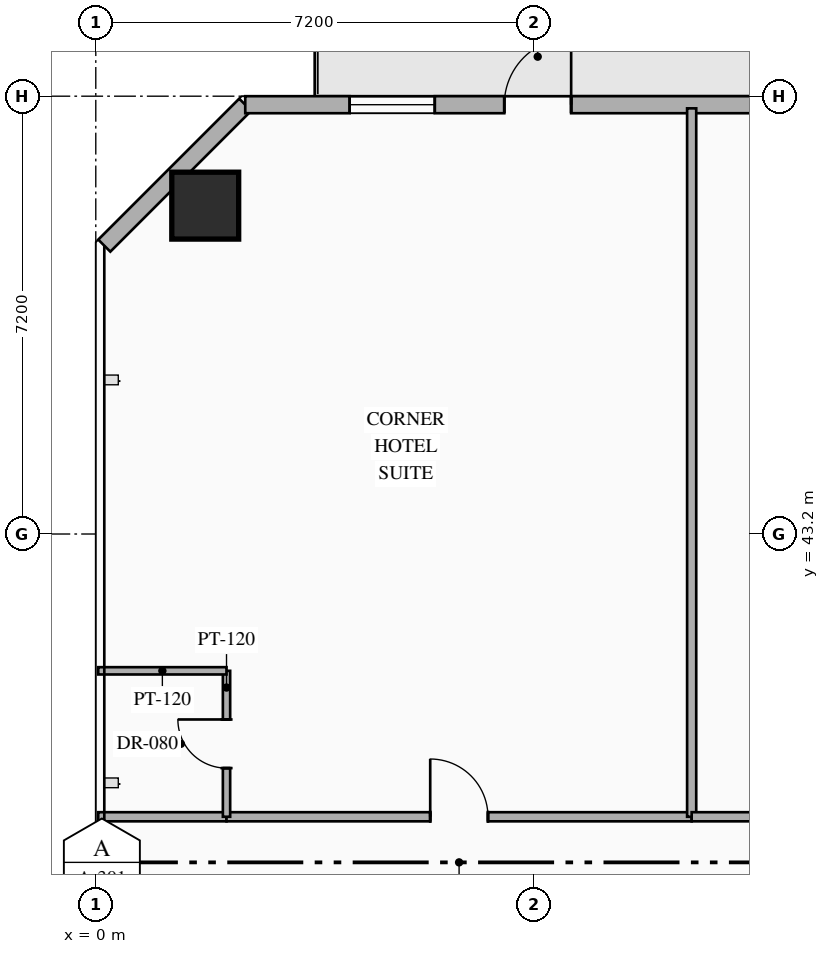
"""IFC4 building model, lengths in metres.
Left out: names, types, materials, properties, quantities, classifications, styles, units other than length and angle.
Written with IfcOpenShell. Run it as: python <this file> out.ifc"""

import sys

from ifc_helpers import new_model, si_unit, direction, frame, frame_2d, origin, origin_2d, place, context, subcontext, project, spatial, rectangle, hollow_rectangle, extrude, element, fill, save


model = new_model("IFC4")
c1 = context("Model", 3, precision=1e-05, world=origin(), true_north=direction((0.0, 1.0)))
c2 = subcontext(c1, "Body", "Model", "MODEL_VIEW")
j1 = project(units=[si_unit("LENGTHUNIT", "METRE"), si_unit("PLANEANGLEUNIT", "RADIAN")], contexts=[c1])
p1 = place(None, origin())
s1 = spatial("IfcSite", under=j1, at=p1, CompositionType="ELEMENT")
p2 = place(p1, origin())
s2 = spatial("IfcBuilding", under=s1, at=p2, CompositionType="ELEMENT")
p3 = place(p2, frame((0.0, 0.0, 39.95)))
s3 = spatial("IfcBuildingStorey", under=s2, at=p3, CompositionType="ELEMENT", Elevation=39.95)
p4 = place(p3, frame((1.8, 48.6, 0.0), z_axis=(0.0, 0.0, 1.0), x_axis=(1.0, 0.0, 0.0)))
e1 = element("IfcColumn", 1, at=p4, inside=s3, PredefinedType="COLUMN", context=c2, shape_type="SweptSolid", body=[
    extrude(hollow_rectangle(XDim=1.1, YDim=1.1, WallThickness=0.04, at=origin_2d()), origin(), (0.0, 0.0, 1.0), 3.35),
])
p5 = place(p3, frame((0.14, 47.942, 0.0), z_axis=(0.0, 0.0, 1.0), x_axis=(0.707106781187, 0.707106781187, 0.0)))
e2 = element("IfcWall", 2, at=p5, inside=s3, PredefinedType="STANDARD", context=c2, shape_type="SweptSolid", body=[
    extrude(rectangle(XDim=3.278, YDim=0.28, at=frame_2d((1.639, 0.0))), origin(), (0.0, 0.0, 1.0), 3.13),
])
p6 = place(p3, frame((2.458, 50.26, 0.0), z_axis=(0.0, 0.0, 1.0), x_axis=(1.0, 0.0, 0.0)))
e3 = element("IfcWall", 3, at=p6, inside=s3, PredefinedType="STANDARD", context=c2, shape_type="SweptSolid", body=[
    extrude(rectangle(XDim=40.084, YDim=0.28, at=frame_2d((20.042, 0.0))), origin(), (0.0, 0.0, 1.0), 3.13),
])
p7 = place(p6, frame((4.26, 0.0, 0.0)))
e4 = element("IfcOpeningElement", 4, at=p7, cuts=e3, PredefinedType="OPENING", context=c2, shape_type="SweptSolid", body=[
    extrude(rectangle(XDim=1.1, YDim=2.2, at=frame_2d((0.55, 1.1))), frame((0.0, 0.15, 0.0), z_axis=(0.0, -1.0, 0.0), x_axis=(1.0, 0.0, 0.0)), (0.0, 0.0, 1.0), 0.3),
])
p8 = place(p6, frame((1.717, 0.0, 0.85)))
e5 = element("IfcOpeningElement", 5, at=p8, cuts=e3, PredefinedType="OPENING", context=c2, shape_type="SweptSolid", body=[
    extrude(rectangle(XDim=1.4, YDim=1.8, at=frame_2d((0.7, 0.9))), frame((0.0, 0.15, 0.0), z_axis=(0.0, -1.0, 0.0), x_axis=(1.0, 0.0, 0.0)), (0.0, 0.0, 1.0), 0.3),
])
p9 = place(p6, frame((10.0, 0.0, 0.85)))
e6 = element("IfcOpeningElement", 6, at=p9, cuts=e3, PredefinedType="OPENING", context=c2, shape_type="SweptSolid", body=[
    extrude(rectangle(XDim=1.4, YDim=1.8, at=frame_2d((0.7, 0.9))), frame((0.0, 0.15, 0.0), z_axis=(0.0, -1.0, 0.0), x_axis=(1.0, 0.0, 0.0)), (0.0, 0.0, 1.0), 0.3),
])
p10 = place(p6, frame((14.02, 0.0, 0.85)))
e7 = element("IfcOpeningElement", 7, at=p10, cuts=e3, PredefinedType="OPENING", context=c2, shape_type="SweptSolid", body=[
    extrude(rectangle(XDim=1.4, YDim=1.8, at=frame_2d((0.7, 0.9))), frame((0.0, 0.15, 0.0), z_axis=(0.0, -1.0, 0.0), x_axis=(1.0, 0.0, 0.0)), (0.0, 0.0, 1.0), 0.3),
])
p11 = place(p6, frame((20.789, 0.0, 0.85)))
e8 = element("IfcOpeningElement", 8, at=p11, cuts=e3, PredefinedType="OPENING", context=c2, shape_type="SweptSolid", body=[
    extrude(rectangle(XDim=1.4, YDim=1.8, at=frame_2d((0.7, 0.9))), frame((0.0, 0.15, 0.0), z_axis=(0.0, -1.0, 0.0), x_axis=(1.0, 0.0, 0.0)), (0.0, 0.0, 1.0), 0.3),
])
p12 = place(p6, frame((24.664, 0.0, 0.85)))
e9 = element("IfcOpeningElement", 9, at=p12, cuts=e3, PredefinedType="OPENING", context=c2, shape_type="SweptSolid", body=[
    extrude(rectangle(XDim=1.4, YDim=1.8, at=frame_2d((0.7, 0.9))), frame((0.0, 0.15, 0.0), z_axis=(0.0, -1.0, 0.0), x_axis=(1.0, 0.0, 0.0)), (0.0, 0.0, 1.0), 0.3),
])
p13 = place(p6, frame((26.803, 0.0, 0.85)))
e10 = element("IfcOpeningElement", 10, at=p13, cuts=e3, PredefinedType="OPENING", context=c2, shape_type="SweptSolid", body=[
    extrude(rectangle(XDim=1.4, YDim=1.8, at=frame_2d((0.7, 0.9))), frame((0.0, 0.15, 0.0), z_axis=(0.0, -1.0, 0.0), x_axis=(1.0, 0.0, 0.0)), (0.0, 0.0, 1.0), 0.3),
])
p14 = place(p6, frame((32.703, 0.0, 0.85)))
e11 = element("IfcOpeningElement", 11, at=p14, cuts=e3, PredefinedType="OPENING", context=c2, shape_type="SweptSolid", body=[
    extrude(rectangle(XDim=1.4, YDim=1.8, at=frame_2d((0.7, 0.9))), frame((0.0, 0.15, 0.0), z_axis=(0.0, -1.0, 0.0), x_axis=(1.0, 0.0, 0.0)), (0.0, 0.0, 1.0), 0.3),
])
p15 = place(p6, frame((36.967, 0.0, 0.85)))
e12 = element("IfcOpeningElement", 12, at=p15, cuts=e3, PredefinedType="OPENING", context=c2, shape_type="SweptSolid", body=[
    extrude(rectangle(XDim=1.4, YDim=1.8, at=frame_2d((0.7, 0.9))), frame((0.0, 0.15, 0.0), z_axis=(0.0, -1.0, 0.0), x_axis=(1.0, 0.0, 0.0)), (0.0, 0.0, 1.0), 0.3),
])
p16 = place(p3, frame((0.04, 38.55, 0.0), z_axis=(0.0, 0.0, 1.0), x_axis=(1.0, 0.0, 0.0)))
e13 = element("IfcWall", 13, at=p16, inside=s3, PredefinedType="PARTITIONING", context=c2, shape_type="SweptSolid", body=[
    extrude(rectangle(XDim=2.11, YDim=0.15, at=frame_2d((1.055, 0.0))), origin(), (0.0, 0.0, 1.0), 2.775),
])
p17 = place(p3, frame((2.15, 38.55, 0.0), z_axis=(0.0, 0.0, 1.0), x_axis=(1.0, 0.0, 0.0)))
e14 = element("IfcWall", 14, at=p17, inside=s3, PredefinedType="PARTITIONING", context=c2, shape_type="SweptSolid", body=[
    extrude(rectangle(XDim=7.65, YDim=0.15, at=frame_2d((3.825, 0.0))), origin(), (0.0, 0.0, 1.0), 2.775),
])
p18 = place(p17, frame((3.35, 0.0, 0.0)))
e15 = element("IfcOpeningElement", 15, at=p18, cuts=e14, PredefinedType="OPENING", context=c2, shape_type="SweptSolid", body=[
    extrude(rectangle(XDim=0.95, YDim=2.15, at=frame_2d((0.475, 1.075))), frame((0.0, 0.085, 0.0), z_axis=(0.0, -1.0, 0.0), x_axis=(1.0, 0.0, 0.0)), (0.0, 0.0, 1.0), 0.17),
])
p19 = place(p3, frame((2.15, 38.55, 0.0), z_axis=(0.0, 0.0, 1.0), x_axis=(0.0, 1.0, 0.0)))
e16 = element("IfcWall", 16, at=p19, inside=s3, PredefinedType="PARTITIONING", context=c2, shape_type="SweptSolid", body=[
    extrude(rectangle(XDim=2.4, YDim=0.12, at=frame_2d((1.2, 0.0))), origin(), (0.0, 0.0, 1.0), 3.13),
])
p20 = place(p19, frame((0.8, 0.0, 0.0)))
e17 = element("IfcOpeningElement", 17, at=p20, cuts=e16, PredefinedType="OPENING", context=c2, shape_type="SweptSolid", body=[
    extrude(rectangle(XDim=0.8, YDim=2.06, at=frame_2d((0.4, 1.03))), frame((0.0, 0.07, 0.0), z_axis=(0.0, -1.0, 0.0), x_axis=(1.0, 0.0, 0.0)), (0.0, 0.0, 1.0), 0.14),
])
p21 = place(p3, frame((0.04, 40.95, 0.0), z_axis=(0.0, 0.0, 1.0), x_axis=(1.0, 0.0, 0.0)))
e18 = element("IfcWall", 18, at=p21, inside=s3, PredefinedType="PARTITIONING", context=c2, shape_type="SweptSolid", body=[
    extrude(rectangle(XDim=2.11, YDim=0.12, at=frame_2d((1.055, 0.0))), origin(), (0.0, 0.0, 1.0), 2.775),
])
p22 = place(p3, frame((9.8, 38.55, 0.0), z_axis=(0.0, 0.0, 1.0), x_axis=(0.0, 1.0, 0.0)))
e19 = element("IfcWall", 19, at=p22, inside=s3, PredefinedType="PARTITIONING", context=c2, shape_type="SweptSolid", body=[
    extrude(rectangle(XDim=11.65, YDim=0.15, at=frame_2d((5.825, 0.0))), origin(), (0.0, 0.0, 1.0), 3.13),
])
p23 = place(p3, frame((9.8, 38.55, 0.0), z_axis=(0.0, 0.0, 1.0), x_axis=(1.0, 0.0, 0.0)))
e20 = element("IfcWall", 20, at=p23, inside=s3, PredefinedType="PARTITIONING", context=c2, shape_type="SweptSolid", body=[
    extrude(rectangle(XDim=7.85, YDim=0.15, at=frame_2d((3.925, 0.0))), origin(), (0.0, 0.0, 1.0), 2.775),
])
p24 = place(p23, frame((3.45, 0.0, 0.0)))
e21 = element("IfcOpeningElement", 21, at=p24, cuts=e20, PredefinedType="OPENING", context=c2, shape_type="SweptSolid", body=[
    extrude(rectangle(XDim=0.95, YDim=2.15, at=frame_2d((0.475, 1.075))), frame((0.0, 0.085, 0.0), z_axis=(0.0, -1.0, 0.0), x_axis=(1.0, 0.0, 0.0)), (0.0, 0.0, 1.0), 0.17),
])
p25 = place(p7, origin())
e22 = element("IfcDoor", 22, at=p25, inside=s3, OperationType="SINGLE_SWING_RIGHT", PredefinedType="DOOR", context=c2, shape_type="SweptSolid", body=[
    extrude(rectangle(XDim=1.1, YDim=2.2, at=frame_2d((0.55, 1.1))), frame((0.0, 0.025, 0.0), z_axis=(0.0, -1.0, 0.0), x_axis=(1.0, 0.0, 0.0)), (0.0, 0.0, 1.0), 0.05),
])
fill(e4, e22)
p26 = place(p8, origin())
e23 = element("IfcWindow", 23, at=p26, inside=s3, PartitioningType="SINGLE_PANEL", PredefinedType="WINDOW", context=c2, shape_type="SweptSolid", body=[
    extrude(rectangle(XDim=1.4, YDim=1.8, at=frame_2d((0.7, 0.9))), frame((0.0, 0.03, 0.0), z_axis=(0.0, -1.0, 0.0), x_axis=(1.0, 0.0, 0.0)), (0.0, 0.0, 1.0), 0.06),
])
fill(e5, e23)
p27 = place(p18, origin())
e24 = element("IfcDoor", 24, at=p27, inside=s3, OperationType="SINGLE_SWING_LEFT", PredefinedType="DOOR", context=c2, shape_type="SweptSolid", body=[
    extrude(rectangle(XDim=0.95, YDim=2.15, at=frame_2d((0.475, 1.075))), frame((0.0, 0.025, 0.0), z_axis=(0.0, -1.0, 0.0), x_axis=(1.0, 0.0, 0.0)), (0.0, 0.0, 1.0), 0.05),
])
fill(e15, e24)
p28 = place(p20, origin())
e25 = element("IfcDoor", 25, at=p28, inside=s3, OperationType="SINGLE_SWING_RIGHT", PredefinedType="DOOR", context=c2, shape_type="SweptSolid", body=[
    extrude(rectangle(XDim=0.8, YDim=2.06, at=frame_2d((0.4, 1.03))), frame((0.0, 0.025, 0.0), z_axis=(0.0, -1.0, 0.0), x_axis=(1.0, 0.0, 0.0)), (0.0, 0.0, 1.0), 0.05),
])
fill(e17, e25)
save(model, sys.argv[1])
